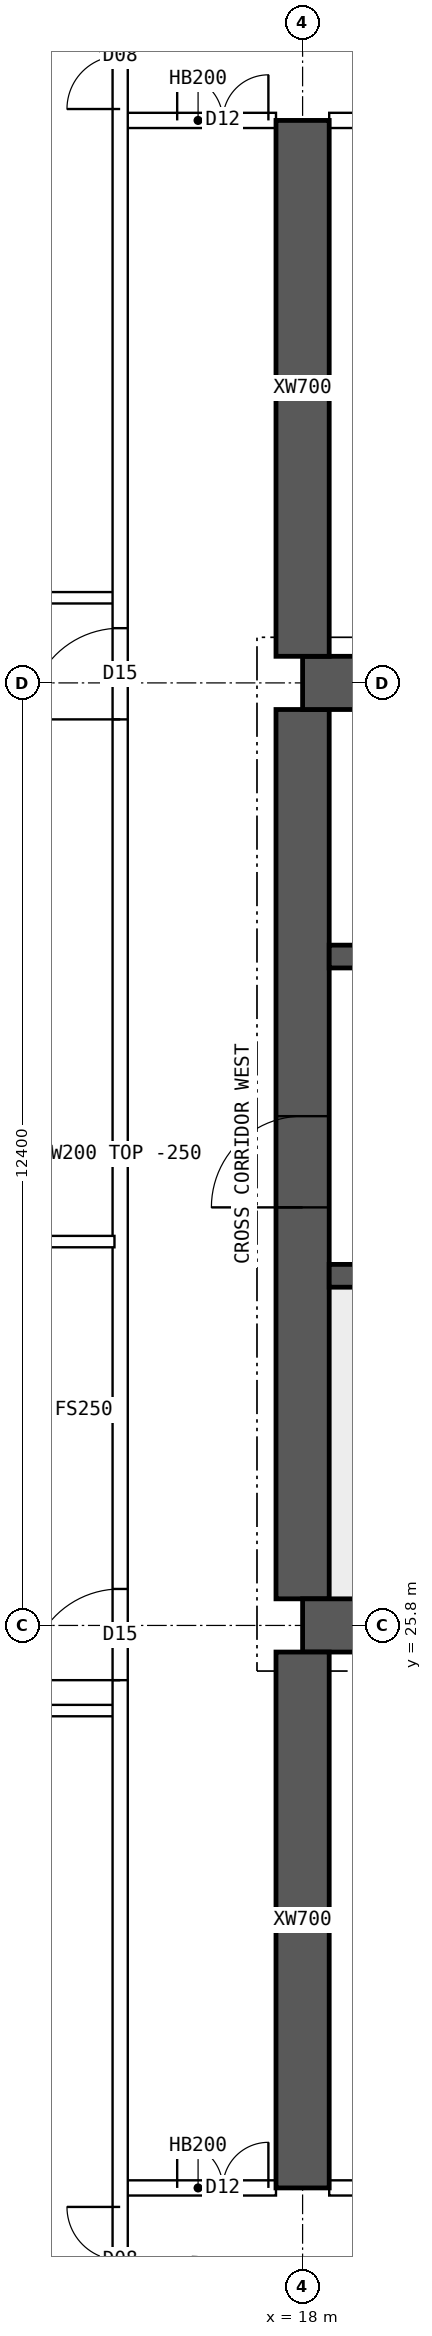
"""IFC4 building model, lengths in metres.
Left out: names, types, materials, properties, quantities, classifications, styles, units other than length and angle.
Written with IfcOpenShell. Run it as: python <this file> out.ifc"""

import sys

from ifc_helpers import new_model, si_unit, direction, frame, frame_2d, origin, place, context, subcontext, project, spatial, polyline, rectangle, outline, extrude, element, fill, save


model = new_model("IFC4")
c1 = context("Model", 3, precision=1e-05, world=origin(), true_north=direction((0.0, 1.0)))
c2 = subcontext(c1, "Body", "Model", "MODEL_VIEW")
j1 = project(units=[si_unit("LENGTHUNIT", "METRE"), si_unit("PLANEANGLEUNIT", "RADIAN")], contexts=[c1])
p1 = place(None, origin())
s1 = spatial("IfcSite", under=j1, at=p1, CompositionType="ELEMENT")
p2 = place(p1, origin())
s2 = spatial("IfcBuilding", under=s1, at=p2, CompositionType="ELEMENT")
p3 = place(p2, frame((0.0, 0.0, 224.05)))
s3 = spatial("IfcBuildingStorey", under=s2, at=p3, CompositionType="ELEMENT", Elevation=224.05)
for number, where, z_axis, x_axis in (
    (1, (18.0, 25.8, 0.0), (0.0, 0.0, 1.0), (1.0, 0.0, 0.0)),
    (2, (18.0, 38.2, 0.0), (0.0, 0.0, 1.0), (1.0, 0.0, 0.0)),
):
    element("IfcWall", number, at=place(p3, frame(where, z_axis=z_axis, x_axis=x_axis)), inside=s3, PredefinedType="SHEAR", context=c2, shape_type="SweptSolid", body=[
        extrude(rectangle(XDim=48.0, YDim=0.7, at=frame_2d((24.0, 0.0))), origin(), (0.0, 0.0, 1.0), 3.75),
    ])
p4 = place(p3, frame((18.0, 26.15, 0.0), z_axis=(0.0, 0.0, 1.0), x_axis=(0.0, 1.0, 0.0)))
e3 = element("IfcWall", 3, at=p4, inside=s3, PredefinedType="SHEAR", context=c2, shape_type="SweptSolid", body=[
    extrude(rectangle(XDim=11.7, YDim=0.7, at=frame_2d((5.85, 0.0))), origin(), (0.0, 0.0, 1.0), 3.75),
])
p5 = place(p4, frame((5.15, 0.0, 0.0)))
e4 = element("IfcOpeningElement", 4, at=p5, cuts=e3, PredefinedType="OPENING", context=c2, shape_type="SweptSolid", body=[
    extrude(rectangle(XDim=1.2, YDim=2.1, at=frame_2d((0.6, 1.05))), frame((0.0, 0.36, 0.0), z_axis=(0.0, -1.0, 0.0), x_axis=(1.0, 0.0, 0.0)), (0.0, 0.0, 1.0), 0.72),
])
p6 = place(p3, frame((18.35, 30.4, 0.0), z_axis=(0.0, 0.0, 1.0), x_axis=(1.0, 0.0, 0.0)))
e5 = element("IfcWall", 5, at=p6, inside=s3, PredefinedType="SHEAR", context=c2, shape_type="SweptSolid", body=[
    extrude(rectangle(XDim=47.3, YDim=0.3, at=frame_2d((23.65, 0.0))), origin(), (0.0, 0.0, 1.0), 3.75),
])
p7 = place(p6, frame((0.4, 0.0, 0.0)))
e6 = element("IfcOpeningElement", 6, at=p7, cuts=e5, PredefinedType="OPENING", context=c2, shape_type="SweptSolid", body=[
    extrude(rectangle(XDim=1.0, YDim=2.1, at=frame_2d((0.5, 1.05))), frame((0.0, 0.16, 0.0), z_axis=(0.0, -1.0, 0.0), x_axis=(1.0, 0.0, 0.0)), (0.0, 0.0, 1.0), 0.32),
])
p8 = place(p6, frame((45.9, 0.0, 0.0)))
e7 = element("IfcOpeningElement", 7, at=p8, cuts=e5, PredefinedType="OPENING", context=c2, shape_type="SweptSolid", body=[
    extrude(rectangle(XDim=1.0, YDim=2.1, at=frame_2d((0.5, 1.05))), frame((0.0, 0.16, 0.0), z_axis=(0.0, -1.0, 0.0), x_axis=(1.0, 0.0, 0.0)), (0.0, 0.0, 1.0), 0.32),
])
p9 = place(p6, frame((8.4, 0.0, 0.0)))
e8 = element("IfcOpeningElement", 8, at=p9, cuts=e5, PredefinedType="OPENING", context=c2, shape_type="SweptSolid", body=[
    extrude(rectangle(XDim=1.1, YDim=2.1, at=frame_2d((0.55, 1.05))), frame((0.0, 0.16, 0.0), z_axis=(0.0, -1.0, 0.0), x_axis=(1.0, 0.0, 0.0)), (0.0, 0.0, 1.0), 0.32),
])
p10 = place(p6, frame((11.0, 0.0, 0.0)))
e9 = element("IfcOpeningElement", 9, at=p10, cuts=e5, PredefinedType="OPENING", context=c2, shape_type="SweptSolid", body=[
    extrude(rectangle(XDim=1.1, YDim=2.1, at=frame_2d((0.55, 1.05))), frame((0.0, 0.16, 0.0), z_axis=(0.0, -1.0, 0.0), x_axis=(1.0, 0.0, 0.0)), (0.0, 0.0, 1.0), 0.32),
])
p11 = place(p6, frame((13.6, 0.0, 0.0)))
e10 = element("IfcOpeningElement", 10, at=p11, cuts=e5, PredefinedType="OPENING", context=c2, shape_type="SweptSolid", body=[
    extrude(rectangle(XDim=1.1, YDim=2.1, at=frame_2d((0.55, 1.05))), frame((0.0, 0.16, 0.0), z_axis=(0.0, -1.0, 0.0), x_axis=(1.0, 0.0, 0.0)), (0.0, 0.0, 1.0), 0.32),
])
p12 = place(p6, frame((16.2, 0.0, 0.0)))
e11 = element("IfcOpeningElement", 11, at=p12, cuts=e5, PredefinedType="OPENING", context=c2, shape_type="SweptSolid", body=[
    extrude(rectangle(XDim=1.1, YDim=2.1, at=frame_2d((0.55, 1.05))), frame((0.0, 0.16, 0.0), z_axis=(0.0, -1.0, 0.0), x_axis=(1.0, 0.0, 0.0)), (0.0, 0.0, 1.0), 0.32),
])
p13 = place(p6, frame((18.975, 0.0, 0.0)))
e12 = element("IfcOpeningElement", 12, at=p13, cuts=e5, PredefinedType="OPENING", context=c2, shape_type="SweptSolid", body=[
    extrude(rectangle(XDim=0.9, YDim=2.1, at=frame_2d((0.45, 1.05))), frame((0.0, 0.16, 0.0), z_axis=(0.0, -1.0, 0.0), x_axis=(1.0, 0.0, 0.0)), (0.0, 0.0, 1.0), 0.32),
])
p14 = place(p6, frame((24.475, 0.0, 0.0)))
e13 = element("IfcOpeningElement", 13, at=p14, cuts=e5, PredefinedType="OPENING", context=c2, shape_type="SweptSolid", body=[
    extrude(rectangle(XDim=0.9, YDim=2.1, at=frame_2d((0.45, 1.05))), frame((0.0, 0.16, 0.0), z_axis=(0.0, -1.0, 0.0), x_axis=(1.0, 0.0, 0.0)), (0.0, 0.0, 1.0), 0.32),
])
p15 = place(p6, frame((30.267, 0.0, 0.0)))
e14 = element("IfcOpeningElement", 14, at=p15, cuts=e5, PredefinedType="OPENING", context=c2, shape_type="SweptSolid", body=[
    extrude(rectangle(XDim=1.1, YDim=2.1, at=frame_2d((0.55, 1.05))), frame((0.0, 0.16, 0.0), z_axis=(0.0, -1.0, 0.0), x_axis=(1.0, 0.0, 0.0)), (0.0, 0.0, 1.0), 0.32),
])
p16 = place(p6, frame((33.8, 0.0, 0.0)))
e15 = element("IfcOpeningElement", 15, at=p16, cuts=e5, PredefinedType="OPENING", context=c2, shape_type="SweptSolid", body=[
    extrude(rectangle(XDim=1.1, YDim=2.1, at=frame_2d((0.55, 1.05))), frame((0.0, 0.16, 0.0), z_axis=(0.0, -1.0, 0.0), x_axis=(1.0, 0.0, 0.0)), (0.0, 0.0, 1.0), 0.32),
])
p17 = place(p6, frame((37.333, 0.0, 0.0)))
e16 = element("IfcOpeningElement", 16, at=p17, cuts=e5, PredefinedType="OPENING", context=c2, shape_type="SweptSolid", body=[
    extrude(rectangle(XDim=1.1, YDim=2.1, at=frame_2d((0.55, 1.05))), frame((0.0, 0.16, 0.0), z_axis=(0.0, -1.0, 0.0), x_axis=(1.0, 0.0, 0.0)), (0.0, 0.0, 1.0), 0.32),
])
p18 = place(p3, frame((18.35, 34.6, 0.0), z_axis=(0.0, 0.0, 1.0), x_axis=(1.0, 0.0, 0.0)))
e17 = element("IfcWall", 17, at=p18, inside=s3, PredefinedType="SHEAR", context=c2, shape_type="SweptSolid", body=[
    extrude(rectangle(XDim=47.3, YDim=0.3, at=frame_2d((23.65, 0.0))), origin(), (0.0, 0.0, 1.0), 3.75),
])
p19 = place(p18, frame((0.9, 0.0, 0.0)))
e18 = element("IfcOpeningElement", 18, at=p19, cuts=e17, PredefinedType="OPENING", context=c2, shape_type="SweptSolid", body=[
    extrude(rectangle(XDim=1.1, YDim=2.1, at=frame_2d((0.55, 1.05))), frame((0.0, 0.16, 0.0), z_axis=(0.0, -1.0, 0.0), x_axis=(1.0, 0.0, 0.0)), (0.0, 0.0, 1.0), 0.32),
])
p20 = place(p18, frame((45.3, 0.0, 0.0)))
e19 = element("IfcOpeningElement", 19, at=p20, cuts=e17, PredefinedType="OPENING", context=c2, shape_type="SweptSolid", body=[
    extrude(rectangle(XDim=1.1, YDim=2.1, at=frame_2d((0.55, 1.05))), frame((0.0, 0.16, 0.0), z_axis=(0.0, -1.0, 0.0), x_axis=(1.0, 0.0, 0.0)), (0.0, 0.0, 1.0), 0.32),
])
p21 = place(p18, frame((4.25, 0.0, 0.0)))
e20 = element("IfcOpeningElement", 20, at=p21, cuts=e17, PredefinedType="OPENING", context=c2, shape_type="SweptSolid", body=[
    extrude(rectangle(XDim=0.9, YDim=2.1, at=frame_2d((0.45, 1.05))), frame((0.0, 0.16, 0.0), z_axis=(0.0, -1.0, 0.0), x_axis=(1.0, 0.0, 0.0)), (0.0, 0.0, 1.0), 0.32),
])
p22 = place(p18, frame((42.15, 0.0, 0.0)))
e21 = element("IfcOpeningElement", 21, at=p22, cuts=e17, PredefinedType="OPENING", context=c2, shape_type="SweptSolid", body=[
    extrude(rectangle(XDim=0.9, YDim=2.1, at=frame_2d((0.45, 1.05))), frame((0.0, 0.16, 0.0), z_axis=(0.0, -1.0, 0.0), x_axis=(1.0, 0.0, 0.0)), (0.0, 0.0, 1.0), 0.32),
])
p23 = place(p18, frame((9.025, 0.0, 0.0)))
e22 = element("IfcOpeningElement", 22, at=p23, cuts=e17, PredefinedType="OPENING", context=c2, shape_type="SweptSolid", body=[
    extrude(rectangle(XDim=0.9, YDim=2.1, at=frame_2d((0.45, 1.05))), frame((0.0, 0.16, 0.0), z_axis=(0.0, -1.0, 0.0), x_axis=(1.0, 0.0, 0.0)), (0.0, 0.0, 1.0), 0.32),
])
p24 = place(p18, frame((12.999, 0.0, 0.0)))
e23 = element("IfcOpeningElement", 23, at=p24, cuts=e17, PredefinedType="OPENING", context=c2, shape_type="SweptSolid", body=[
    extrude(rectangle(XDim=0.9, YDim=2.1, at=frame_2d((0.45, 1.05))), frame((0.0, 0.16, 0.0), z_axis=(0.0, -1.0, 0.0), x_axis=(1.0, 0.0, 0.0)), (0.0, 0.0, 1.0), 0.32),
])
p25 = place(p18, frame((16.646, 0.0, 0.0)))
e24 = element("IfcOpeningElement", 24, at=p25, cuts=e17, PredefinedType="OPENING", context=c2, shape_type="SweptSolid", body=[
    extrude(rectangle(XDim=0.9, YDim=2.1, at=frame_2d((0.45, 1.05))), frame((0.0, 0.16, 0.0), z_axis=(0.0, -1.0, 0.0), x_axis=(1.0, 0.0, 0.0)), (0.0, 0.0, 1.0), 0.32),
])
p26 = place(p18, frame((20.405, 0.0, 0.0)))
e25 = element("IfcOpeningElement", 25, at=p26, cuts=e17, PredefinedType="OPENING", context=c2, shape_type="SweptSolid", body=[
    extrude(rectangle(XDim=0.9, YDim=2.1, at=frame_2d((0.45, 1.05))), frame((0.0, 0.16, 0.0), z_axis=(0.0, -1.0, 0.0), x_axis=(1.0, 0.0, 0.0)), (0.0, 0.0, 1.0), 0.32),
])
p27 = place(p18, frame((24.811, 0.0, 0.0)))
e26 = element("IfcOpeningElement", 26, at=p27, cuts=e17, PredefinedType="OPENING", context=c2, shape_type="SweptSolid", body=[
    extrude(rectangle(XDim=0.9, YDim=2.1, at=frame_2d((0.45, 1.05))), frame((0.0, 0.16, 0.0), z_axis=(0.0, -1.0, 0.0), x_axis=(1.0, 0.0, 0.0)), (0.0, 0.0, 1.0), 0.32),
])
p28 = place(p18, frame((27.608, 0.0, 0.0)))
e27 = element("IfcOpeningElement", 27, at=p28, cuts=e17, PredefinedType="OPENING", context=c2, shape_type="SweptSolid", body=[
    extrude(rectangle(XDim=0.9, YDim=2.1, at=frame_2d((0.45, 1.05))), frame((0.0, 0.16, 0.0), z_axis=(0.0, -1.0, 0.0), x_axis=(1.0, 0.0, 0.0)), (0.0, 0.0, 1.0), 0.32),
])
p29 = place(p18, frame((29.575, 0.0, 0.0)))
e28 = element("IfcOpeningElement", 28, at=p29, cuts=e17, PredefinedType="OPENING", context=c2, shape_type="SweptSolid", body=[
    extrude(rectangle(XDim=0.9, YDim=2.1, at=frame_2d((0.45, 1.05))), frame((0.0, 0.16, 0.0), z_axis=(0.0, -1.0, 0.0), x_axis=(1.0, 0.0, 0.0)), (0.0, 0.0, 1.0), 0.32),
])
p30 = place(p18, frame((32.007, 0.0, 0.0)))
e29 = element("IfcOpeningElement", 29, at=p30, cuts=e17, PredefinedType="OPENING", context=c2, shape_type="SweptSolid", body=[
    extrude(rectangle(XDim=0.9, YDim=2.1, at=frame_2d((0.45, 1.05))), frame((0.0, 0.16, 0.0), z_axis=(0.0, -1.0, 0.0), x_axis=(1.0, 0.0, 0.0)), (0.0, 0.0, 1.0), 0.32),
])
p31 = place(p18, frame((34.742, 0.0, 0.0)))
e30 = element("IfcOpeningElement", 30, at=p31, cuts=e17, PredefinedType="OPENING", context=c2, shape_type="SweptSolid", body=[
    extrude(rectangle(XDim=0.9, YDim=2.1, at=frame_2d((0.45, 1.05))), frame((0.0, 0.16, 0.0), z_axis=(0.0, -1.0, 0.0), x_axis=(1.0, 0.0, 0.0)), (0.0, 0.0, 1.0), 0.32),
])
p32 = place(p18, frame((37.781, 0.0, 0.0)))
e31 = element("IfcOpeningElement", 31, at=p32, cuts=e17, PredefinedType="OPENING", context=c2, shape_type="SweptSolid", body=[
    extrude(rectangle(XDim=0.9, YDim=2.1, at=frame_2d((0.45, 1.05))), frame((0.0, 0.16, 0.0), z_axis=(0.0, -1.0, 0.0), x_axis=(1.0, 0.0, 0.0)), (0.0, 0.0, 1.0), 0.32),
])
for number, where, z_axis, x_axis in (
    (32, (18.0, 18.4, 0.0), (0.0, 0.0, 1.0), (0.0, 1.0, 0.0)),
    (33, (18.0, 38.55, 0.0), (0.0, 0.0, 1.0), (0.0, 1.0, 0.0)),
):
    element("IfcWall", number, at=place(p3, frame(where, z_axis=z_axis, x_axis=x_axis)), inside=s3, PredefinedType="SHEAR", context=c2, shape_type="SweptSolid", body=[
        extrude(rectangle(XDim=7.05, YDim=0.7, at=frame_2d((3.525, 0.0))), origin(), (0.0, 0.0, 1.0), 3.75),
    ])
p33 = place(p3, frame((15.6, 18.4, 0.0), z_axis=(0.0, 0.0, 1.0), x_axis=(1.0, 0.0, 0.0)))
e34 = element("IfcWall", 34, at=p33, inside=s3, PredefinedType="SOLIDWALL", context=c2, shape_type="SweptSolid", body=[
    extrude(rectangle(XDim=2.05, YDim=0.2, at=frame_2d((1.025, 0.0))), origin(), (0.0, 0.0, 1.0), 3.5),
])
p34 = place(p33, frame((0.75, 0.0, 0.0)))
e35 = element("IfcOpeningElement", 35, at=p34, cuts=e34, PredefinedType="OPENING", context=c2, shape_type="SweptSolid", body=[
    extrude(rectangle(XDim=1.2, YDim=2.1, at=frame_2d((0.6, 1.05))), frame((0.0, 0.11, 0.0), z_axis=(0.0, -1.0, 0.0), x_axis=(1.0, 0.0, 0.0)), (0.0, 0.0, 1.0), 0.22),
])
p35 = place(p3, frame((18.35, 18.4, 0.0), z_axis=(0.0, 0.0, 1.0), x_axis=(1.0, 0.0, 0.0)))
e36 = element("IfcWall", 36, at=p35, inside=s3, PredefinedType="SOLIDWALL", context=c2, shape_type="SweptSolid", body=[
    extrude(rectangle(XDim=5.3, YDim=0.2, at=frame_2d((2.65, 0.0))), origin(), (0.0, 0.0, 1.0), 3.5),
])
p36 = place(p35, frame((0.35, 0.0, 0.0)))
e37 = element("IfcOpeningElement", 37, at=p36, cuts=e36, PredefinedType="OPENING", context=c2, shape_type="SweptSolid", body=[
    extrude(rectangle(XDim=0.9, YDim=2.1, at=frame_2d((0.45, 1.05))), frame((0.0, 0.11, 0.0), z_axis=(0.0, -1.0, 0.0), x_axis=(1.0, 0.0, 0.0)), (0.0, 0.0, 1.0), 0.22),
])
p37 = place(p35, frame((3.2, 0.0, 0.0)))
e38 = element("IfcOpeningElement", 38, at=p37, cuts=e36, PredefinedType="OPENING", context=c2, shape_type="SweptSolid", body=[
    extrude(rectangle(XDim=0.9, YDim=2.1, at=frame_2d((0.45, 1.05))), frame((0.0, 0.11, 0.0), z_axis=(0.0, -1.0, 0.0), x_axis=(1.0, 0.0, 0.0)), (0.0, 0.0, 1.0), 0.22),
])
p38 = place(p3, frame((15.6, 45.6, 0.0), z_axis=(0.0, 0.0, 1.0), x_axis=(1.0, 0.0, 0.0)))
e39 = element("IfcWall", 39, at=p38, inside=s3, PredefinedType="SOLIDWALL", context=c2, shape_type="SweptSolid", body=[
    extrude(rectangle(XDim=2.05, YDim=0.2, at=frame_2d((1.025, 0.0))), origin(), (0.0, 0.0, 1.0), 3.5),
])
p39 = place(p38, frame((0.75, 0.0, 0.0)))
e40 = element("IfcOpeningElement", 40, at=p39, cuts=e39, PredefinedType="OPENING", context=c2, shape_type="SweptSolid", body=[
    extrude(rectangle(XDim=1.2, YDim=2.1, at=frame_2d((0.6, 1.05))), frame((0.0, 0.11, 0.0), z_axis=(0.0, -1.0, 0.0), x_axis=(1.0, 0.0, 0.0)), (0.0, 0.0, 1.0), 0.22),
])
p40 = place(p3, frame((18.35, 45.6, 0.0), z_axis=(0.0, 0.0, 1.0), x_axis=(1.0, 0.0, 0.0)))
e41 = element("IfcWall", 41, at=p40, inside=s3, PredefinedType="SOLIDWALL", context=c2, shape_type="SweptSolid", body=[
    extrude(rectangle(XDim=5.3, YDim=0.2, at=frame_2d((2.65, 0.0))), origin(), (0.0, 0.0, 1.0), 3.5),
])
p41 = place(p40, frame((0.8, 0.0, 0.0)))
e42 = element("IfcOpeningElement", 42, at=p41, cuts=e41, PredefinedType="OPENING", context=c2, shape_type="SweptSolid", body=[
    extrude(rectangle(XDim=1.0, YDim=2.1, at=frame_2d((0.5, 1.05))), frame((0.0, 0.11, 0.0), z_axis=(0.0, -1.0, 0.0), x_axis=(1.0, 0.0, 0.0)), (0.0, 0.0, 1.0), 0.22),
])
p42 = place(p3, frame((8.705, 30.85, 0.0), z_axis=(0.0, 0.0, 1.0), x_axis=(1.0, 0.0, 0.0)))
e43 = element("IfcWall", 43, at=p42, inside=s3, PredefinedType="PARTITIONING", context=c2, shape_type="SweptSolid", body=[
    extrude(outline(polyline([(0.0, 0.0), (6.82, 0.0), (6.82, 3.5), (3.597, 3.5), (3.595, 3.05), (2.997, 3.05), (2.995, 3.5), (0.0, 3.5), (0.0, 0.0)])), frame((0.0, 0.075, 0.0), z_axis=(0.0, -1.0, 0.0), x_axis=(1.0, 0.0, 0.0)), (0.0, 0.0, 1.0), 0.15),
])
p43 = place(p3, frame((15.6, 11.646, 0.0), z_axis=(0.0, 0.0, 1.0), x_axis=(0.0, 1.0, 0.0)))
e44 = element("IfcWall", 44, at=p43, inside=s3, PredefinedType="SOLIDWALL", context=c2, shape_type="SweptSolid", body=[
    extrude(rectangle(XDim=40.708, YDim=0.2, at=frame_2d((20.354, 0.0))), origin(), (0.0, 0.0, 1.0), 3.5),
])
p44 = place(p43, frame((13.434, 0.0, 0.0)))
e45 = element("IfcOpeningElement", 45, at=p44, cuts=e44, PredefinedType="OPENING", context=c2, shape_type="SweptSolid", body=[
    extrude(rectangle(XDim=1.2, YDim=2.1, at=frame_2d((0.6, 1.05))), frame((0.0, 0.11, 0.0), z_axis=(0.0, -1.0, 0.0), x_axis=(1.0, 0.0, 0.0)), (0.0, 0.0, 1.0), 0.22),
])
p45 = place(p43, frame((26.074, 0.0, 0.0)))
e46 = element("IfcOpeningElement", 46, at=p45, cuts=e44, PredefinedType="OPENING", context=c2, shape_type="SweptSolid", body=[
    extrude(rectangle(XDim=1.2, YDim=2.1, at=frame_2d((0.6, 1.05))), frame((0.0, 0.11, 0.0), z_axis=(0.0, -1.0, 0.0), x_axis=(1.0, 0.0, 0.0)), (0.0, 0.0, 1.0), 0.22),
])
p46 = place(p43, frame((5.104, 0.0, 0.0)))
e47 = element("IfcOpeningElement", 47, at=p46, cuts=e44, PredefinedType="OPENING", context=c2, shape_type="SweptSolid", body=[
    extrude(rectangle(XDim=1.4, YDim=2.1, at=frame_2d((0.7, 1.05))), frame((0.0, 0.11, 0.0), z_axis=(0.0, -1.0, 0.0), x_axis=(1.0, 0.0, 0.0)), (0.0, 0.0, 1.0), 0.22),
])
p47 = place(p43, frame((34.104, 0.0, 0.0)))
e48 = element("IfcOpeningElement", 48, at=p47, cuts=e44, PredefinedType="OPENING", context=c2, shape_type="SweptSolid", body=[
    extrude(rectangle(XDim=1.4, YDim=2.1, at=frame_2d((0.7, 1.05))), frame((0.0, 0.11, 0.0), z_axis=(0.0, -1.0, 0.0), x_axis=(1.0, 0.0, 0.0)), (0.0, 0.0, 1.0), 0.22),
])
for number, where, z_axis, x_axis in (
    (49, (8.705, 24.68, 0.0), (0.0, 0.0, 1.0), (1.0, 0.0, 0.0)),
    (50, (8.705, 39.32, 0.0), (0.0, 0.0, 1.0), (1.0, 0.0, 0.0)),
):
    element("IfcWall", number, at=place(p3, frame(where, z_axis=z_axis, x_axis=x_axis)), inside=s3, PredefinedType="PARTITIONING", context=c2, shape_type="SweptSolid", body=[
        extrude(rectangle(XDim=6.82, YDim=0.15, at=frame_2d((3.41, 0.0))), origin(), (0.0, 0.0, 1.0), 3.5),
    ])
p48 = place(p5, origin())
e51 = element("IfcDoor", 51, at=p48, inside=s3, OperationType="SINGLE_SWING_LEFT", PredefinedType="DOOR", context=c2, shape_type="SweptSolid", body=[
    extrude(rectangle(XDim=1.2, YDim=2.1, at=frame_2d((0.6, 1.05))), frame((0.0, 0.025, 0.0), z_axis=(0.0, -1.0, 0.0), x_axis=(1.0, 0.0, 0.0)), (0.0, 0.0, 1.0), 0.05),
])
fill(e4, e51)
p49 = place(p34, origin())
e52 = element("IfcDoor", 52, at=p49, inside=s3, OperationType="DOUBLE_DOOR_SINGLE_SWING", PredefinedType="DOOR", context=c2, shape_type="SweptSolid", body=[
    extrude(rectangle(XDim=1.2, YDim=2.1, at=frame_2d((0.6, 1.05))), frame((0.0, 0.025, 0.0), z_axis=(0.0, -1.0, 0.0), x_axis=(1.0, 0.0, 0.0)), (0.0, 0.0, 1.0), 0.05),
])
fill(e35, e52)
p50 = place(p39, origin())
e53 = element("IfcDoor", 53, at=p50, inside=s3, OperationType="DOUBLE_DOOR_SINGLE_SWING", PredefinedType="DOOR", context=c2, shape_type="SweptSolid", body=[
    extrude(rectangle(XDim=1.2, YDim=2.1, at=frame_2d((0.6, 1.05))), frame((0.0, 0.025, 0.0), z_axis=(0.0, -1.0, 0.0), x_axis=(1.0, 0.0, 0.0)), (0.0, 0.0, 1.0), 0.05),
])
fill(e40, e53)
p51 = place(p44, origin())
e54 = element("IfcDoor", 54, at=p51, inside=s3, OperationType="SINGLE_SWING_LEFT", PredefinedType="DOOR", context=c2, shape_type="SweptSolid", body=[
    extrude(rectangle(XDim=1.2, YDim=2.1, at=frame_2d((0.6, 1.05))), frame((0.0, 0.025, 0.0), z_axis=(0.0, -1.0, 0.0), x_axis=(1.0, 0.0, 0.0)), (0.0, 0.0, 1.0), 0.05),
])
fill(e45, e54)
p52 = place(p45, origin())
e55 = element("IfcDoor", 55, at=p52, inside=s3, OperationType="SINGLE_SWING_LEFT", PredefinedType="DOOR", context=c2, shape_type="SweptSolid", body=[
    extrude(rectangle(XDim=1.2, YDim=2.1, at=frame_2d((0.6, 1.05))), frame((0.0, 0.025, 0.0), z_axis=(0.0, -1.0, 0.0), x_axis=(1.0, 0.0, 0.0)), (0.0, 0.0, 1.0), 0.05),
])
fill(e46, e55)
p53 = place(p46, origin())
e56 = element("IfcDoor", 56, at=p53, inside=s3, OperationType="DOUBLE_DOOR_SINGLE_SWING", PredefinedType="DOOR", context=c2, shape_type="SweptSolid", body=[
    extrude(rectangle(XDim=1.4, YDim=2.1, at=frame_2d((0.7, 1.05))), frame((0.0, 0.025, 0.0), z_axis=(0.0, -1.0, 0.0), x_axis=(1.0, 0.0, 0.0)), (0.0, 0.0, 1.0), 0.05),
])
fill(e47, e56)
p54 = place(p47, origin())
e57 = element("IfcDoor", 57, at=p54, inside=s3, OperationType="DOUBLE_DOOR_SINGLE_SWING", PredefinedType="DOOR", context=c2, shape_type="SweptSolid", body=[
    extrude(rectangle(XDim=1.4, YDim=2.1, at=frame_2d((0.7, 1.05))), frame((0.0, 0.025, 0.0), z_axis=(0.0, -1.0, 0.0), x_axis=(1.0, 0.0, 0.0)), (0.0, 0.0, 1.0), 0.05),
])
fill(e48, e57)
save(model, sys.argv[1])
